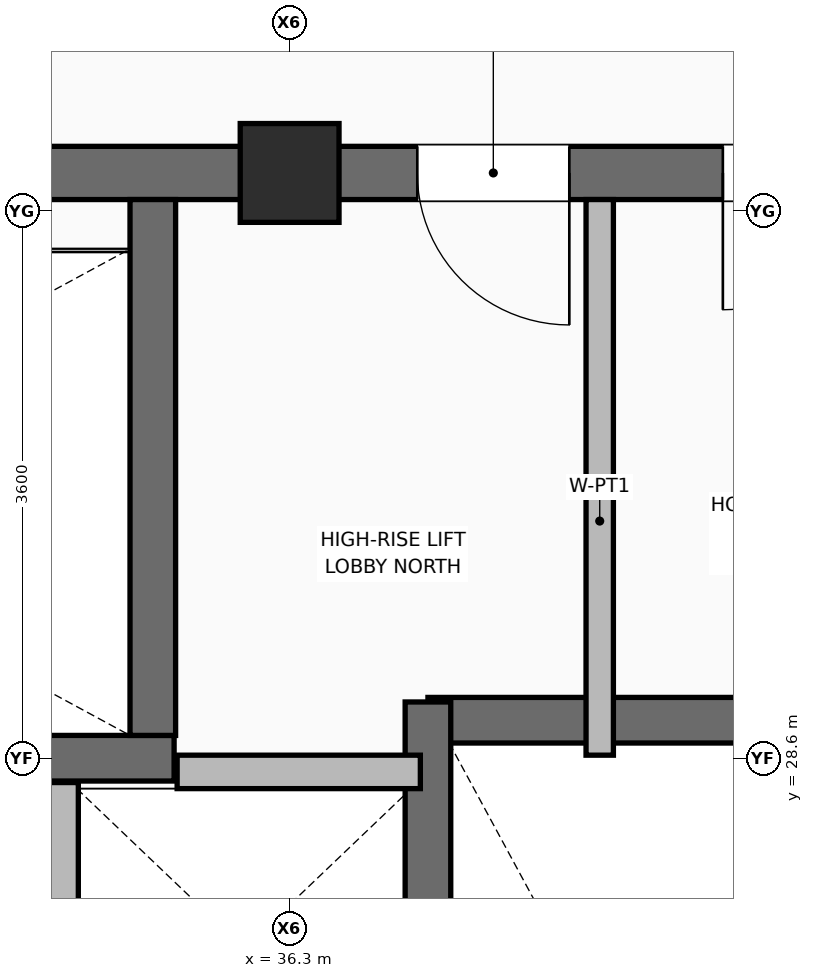
"""IFC4 building model, lengths in metres.
Left out: names, types, materials, properties, quantities, classifications, styles, units other than length and angle.
Written with IfcOpenShell. Run it as: python <this file> out.ifc"""

import sys

from ifc_helpers import new_model, si_unit, direction, frame, frame_2d, origin, origin_2d, place, context, subcontext, project, spatial, rectangle, extrude, element, fill, save


model = new_model("IFC4")
c1 = context("Model", 3, precision=1e-05, world=origin(), true_north=direction((0.0, 1.0)))
c2 = subcontext(c1, "Body", "Model", "MODEL_VIEW")
j1 = project(units=[si_unit("LENGTHUNIT", "METRE"), si_unit("PLANEANGLEUNIT", "RADIAN")], contexts=[c1])
p1 = place(None, origin())
s1 = spatial("IfcSite", under=j1, at=p1, CompositionType="ELEMENT")
p2 = place(p1, origin())
s2 = spatial("IfcBuilding", under=s1, at=p2, CompositionType="ELEMENT")
p3 = place(p2, frame((0.0, 0.0, 290.1)))
s3 = spatial("IfcBuildingStorey", under=s2, at=p3, CompositionType="ELEMENT", Elevation=290.1)
p4 = place(p3, frame((36.3, 32.45, 0.0), z_axis=(0.0, 0.0, 1.0), x_axis=(1.0, 0.0, 0.0)))
e1 = element("IfcColumn", 1, at=p4, inside=s3, PredefinedType="COLUMN", context=c2, shape_type="SweptSolid", body=[
    extrude(rectangle(XDim=0.65, YDim=0.65, at=origin_2d()), origin(), (0.0, 0.0, 1.0), 4.8),
])
p5 = place(p3, frame((34.8, 26.23, 0.0), z_axis=(0.0, 0.0, 1.0), x_axis=(0.0, 1.0, 0.0)))
e2 = element("IfcWall", 2, at=p5, inside=s3, PredefinedType="PARTITIONING", context=c2, shape_type="SweptSolid", body=[
    extrude(rectangle(XDim=2.21, YDim=0.22, at=frame_2d((1.105, 0.0))), origin(), (0.0, 0.0, 1.0), 4.595),
])
p6 = place(p3, frame((21.725, 32.45, 0.0), z_axis=(0.0, 0.0, 1.0), x_axis=(1.0, 0.0, 0.0)))
e3 = element("IfcWall", 3, at=p6, inside=s3, PredefinedType="SHEAR", context=c2, shape_type="SweptSolid", body=[
    extrude(rectangle(XDim=19.55, YDim=0.35, at=frame_2d((9.775, 0.0))), origin(), (0.0, 0.0, 1.0), 4.62),
])
p7 = place(p6, frame((2.025, 0.0, 0.0)))
e4 = element("IfcOpeningElement", 4, at=p7, cuts=e3, PredefinedType="OPENING", context=c2, shape_type="SweptSolid", body=[
    extrude(rectangle(XDim=1.1, YDim=2.1, at=frame_2d((0.55, 1.05))), frame((0.0, 0.185, 0.0), z_axis=(0.0, -1.0, 0.0), x_axis=(1.0, 0.0, 0.0)), (0.0, 0.0, 1.0), 0.37),
])
p8 = place(p6, frame((15.415, 0.0, 0.0)))
e5 = element("IfcOpeningElement", 5, at=p8, cuts=e3, PredefinedType="OPENING", context=c2, shape_type="SweptSolid", body=[
    extrude(rectangle(XDim=1.0, YDim=2.1, at=frame_2d((0.5, 1.05))), frame((0.0, 0.185, 0.0), z_axis=(0.0, -1.0, 0.0), x_axis=(1.0, 0.0, 0.0)), (0.0, 0.0, 1.0), 0.37),
])
p9 = place(p6, frame((17.425, 0.0, 0.0)))
e6 = element("IfcOpeningElement", 6, at=p9, cuts=e3, PredefinedType="OPENING", context=c2, shape_type="SweptSolid", body=[
    extrude(rectangle(XDim=0.9, YDim=2.1, at=frame_2d((0.45, 1.05))), frame((0.0, 0.185, 0.0), z_axis=(0.0, -1.0, 0.0), x_axis=(1.0, 0.0, 0.0)), (0.0, 0.0, 1.0), 0.37),
])
p10 = place(p3, frame((37.21, 28.85, 0.0), z_axis=(0.0, 0.0, 1.0), x_axis=(1.0, 0.0, 0.0)))
e7 = element("IfcWall", 7, at=p10, inside=s3, PredefinedType="SHEAR", context=c2, shape_type="SweptSolid", body=[
    extrude(rectangle(XDim=3.715, YDim=0.3, at=frame_2d((1.857, 0.0))), origin(), (0.0, 0.0, 1.0), 4.62),
])
p11 = place(p3, frame((37.21, 20.98, 0.0), z_axis=(0.0, 0.0, 1.0), x_axis=(0.0, 1.0, 0.0)))
e8 = element("IfcWall", 8, at=p11, inside=s3, PredefinedType="SHEAR", context=c2, shape_type="SweptSolid", body=[
    extrude(rectangle(XDim=7.99, YDim=0.3, at=frame_2d((3.995, 0.0))), origin(), (0.0, 0.0, 1.0), 4.62),
])
p12 = place(p3, frame((27.51, 28.6, 0.0), z_axis=(0.0, 0.0, 1.0), x_axis=(1.0, 0.0, 0.0)))
e9 = element("IfcWall", 9, at=p12, inside=s3, PredefinedType="SHEAR", context=c2, shape_type="SweptSolid", body=[
    extrude(rectangle(XDim=8.03, YDim=0.3, at=frame_2d((4.015, 0.0))), origin(), (0.0, 0.0, 1.0), 4.62),
])
p13 = place(p3, frame((35.4, 28.75, 0.0), z_axis=(0.0, 0.0, 1.0), x_axis=(0.0, 1.0, 0.0)))
e10 = element("IfcWall", 10, at=p13, inside=s3, PredefinedType="SHEAR", context=c2, shape_type="SweptSolid", body=[
    extrude(rectangle(XDim=3.525, YDim=0.3, at=frame_2d((1.762, 0.0))), origin(), (0.0, 0.0, 1.0), 4.62),
])
p14 = place(p3, frame((35.56, 28.51, 0.0), z_axis=(0.0, 0.0, 1.0), x_axis=(1.0, 0.0, 0.0)))
e11 = element("IfcWall", 11, at=p14, inside=s3, PredefinedType="PARTITIONING", context=c2, shape_type="SweptSolid", body=[
    extrude(rectangle(XDim=1.6, YDim=0.22, at=frame_2d((0.8, 0.0))), origin(), (0.0, 0.0, 1.0), 4.6),
])
p15 = place(p3, frame((38.34, 28.62, 0.0), z_axis=(0.0, 0.0, 1.0), x_axis=(0.0, 1.0, 0.0)))
e12 = element("IfcWall", 12, at=p15, inside=s3, PredefinedType="PARTITIONING", context=c2, shape_type="SweptSolid", body=[
    extrude(rectangle(XDim=3.655, YDim=0.18, at=frame_2d((1.827, 0.0))), origin(), (0.0, 0.0, 1.0), 4.182),
])
p16 = place(p8, frame((1.0, 0.0, 0.0), z_axis=(0.0, 0.0, 1.0), x_axis=(-1.0, 0.0, 0.0)))
e13 = element("IfcDoor", 13, at=p16, inside=s3, OperationType="SINGLE_SWING_LEFT", PredefinedType="DOOR", context=c2, shape_type="SweptSolid", body=[
    extrude(rectangle(XDim=1.0, YDim=2.1, at=frame_2d((0.5, 1.05))), frame((0.0, 0.025, 0.0), z_axis=(0.0, -1.0, 0.0), x_axis=(1.0, 0.0, 0.0)), (0.0, 0.0, 1.0), 0.05),
])
fill(e5, e13)
p17 = place(p9, frame((0.9, 0.0, 0.0), z_axis=(0.0, 0.0, 1.0), x_axis=(-1.0, 0.0, 0.0)))
e14 = element("IfcDoor", 14, at=p17, inside=s3, OperationType="SINGLE_SWING_RIGHT", PredefinedType="DOOR", context=c2, shape_type="SweptSolid", body=[
    extrude(rectangle(XDim=0.9, YDim=2.1, at=frame_2d((0.45, 1.05))), frame((0.0, 0.025, 0.0), z_axis=(0.0, -1.0, 0.0), x_axis=(1.0, 0.0, 0.0)), (0.0, 0.0, 1.0), 0.05),
])
fill(e6, e14)
save(model, sys.argv[1])
